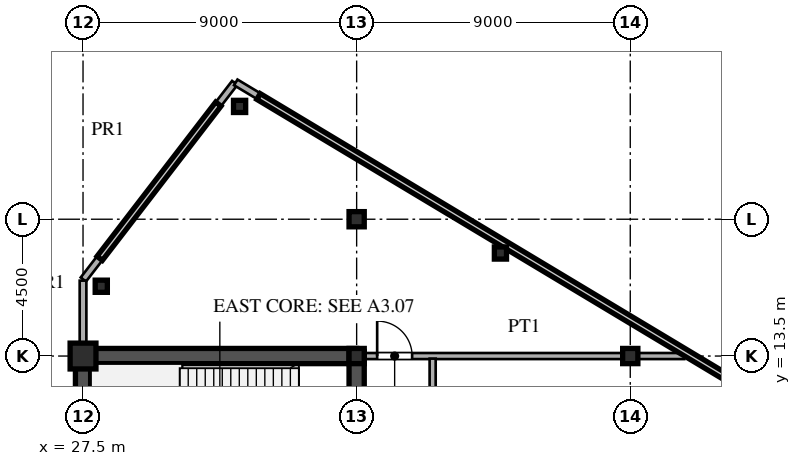
"""IFC4 building model, lengths in metres.
Left out: names, types, materials, properties, quantities, classifications, styles, units other than length and angle.
Written with IfcOpenShell. Run it as: python <this file> out.ifc"""

import sys

from ifc_helpers import new_model, si_unit, direction, frame, frame_2d, origin, origin_2d, place, context, subcontext, project, spatial, rectangle, hollow_rectangle, i_section, extrude, source, transform, mapped, element, fill, save


model = new_model("IFC4")
c1 = context("Model", 3, precision=1e-05, world=origin(), true_north=direction((0.0, 1.0)))
c2 = subcontext(c1, "Body", "Model", "MODEL_VIEW")
j1 = project(units=[si_unit("LENGTHUNIT", "METRE"), si_unit("PLANEANGLEUNIT", "RADIAN")], contexts=[c1])
p1 = place(None, origin())
s1 = spatial("IfcSite", under=j1, at=p1, CompositionType="ELEMENT")
p2 = place(p1, origin())
s2 = spatial("IfcBuilding", under=s1, at=p2, CompositionType="ELEMENT")
p3 = place(p2, frame((0.0, 0.0, 224.7)))
s3 = spatial("IfcBuildingStorey", under=s2, at=p3, CompositionType="ELEMENT", Elevation=224.7)
m1 = source(origin(), c2, "Body", "SweptSolid", [
    extrude(hollow_rectangle(XDim=0.85, YDim=0.85, WallThickness=0.036, at=origin_2d()), origin(), (0.0, 0.0, 1.0), 5.1),
])
p4 = place(p3, frame((27.5, 13.5, 0.0), z_axis=(0.0, 0.0, 1.0), x_axis=(1.0, 0.0, 0.0)))
e1 = element("IfcColumn", 1, at=p4, inside=s3, PredefinedType="COLUMN", context=c2, shape_type="MappedRepresentation", body=[
    mapped(m1, transform((0.0, 0.0, 0.0), scale=1.0)),
])
m2 = source(origin(), c2, "Body", "SweptSolid", [
    extrude(i_section(OverallWidth=0.5, OverallDepth=0.5, WebThickness=0.02, FlangeThickness=0.032, at=origin_2d()), origin(), (0.0, 0.0, 1.0), 5.1),
])
for number, where, z_axis, x_axis in (
    (2, (36.5, 13.5, 0.0), (0.0, 0.0, 1.0), (1.0, 0.0, 0.0)),
    (3, (36.5, 18.0, 0.0), (0.0, 0.0, 1.0), (1.0, 0.0, 0.0)),
    (4, (45.5, 13.5, 0.0), (0.0, 0.0, 1.0), (1.0, 0.0, 0.0)),
):
    element("IfcColumn", number, at=place(p3, frame(where, z_axis=z_axis, x_axis=x_axis)), inside=s3, PredefinedType="COLUMN", context=c2, shape_type="MappedRepresentation", body=[
        mapped(m2, transform((0.0, 0.0, 0.0), scale=1.0)),
    ])
m3 = source(origin(), c2, "Body", "SweptSolid", [
    extrude(hollow_rectangle(XDim=0.4, YDim=0.4, WallThickness=0.016, at=origin_2d()), origin(), (0.0, 0.0, 1.0), 5.1),
])
for number, where, z_axis, x_axis in (
    (5, (32.65, 21.71, 0.0), (0.0, 0.0, 1.0), (1.0, 0.0, 0.0)),
    (6, (28.1, 15.796, 0.0), (0.0, 0.0, 1.0), (1.0, 0.0, 0.0)),
    (7, (41.23, 16.889, 0.0), (0.0, 0.0, 1.0), (1.0, 0.0, 0.0)),
):
    element("IfcColumn", number, at=place(p3, frame(where, z_axis=z_axis, x_axis=x_axis)), inside=s3, PredefinedType="COLUMN", context=c2, shape_type="MappedRepresentation", body=[
        mapped(m3, transform((0.0, 0.0, 0.0), scale=1.0)),
    ])
p5 = place(p3, frame((67.483, 1.51, 0.0), z_axis=(0.0, 0.0, 1.0), x_axis=(-0.857492925713, 0.514495755428, 0.0)))
e8 = element("IfcWall", 8, at=p5, inside=s3, PredefinedType="PARAPET", context=c2, shape_type="SweptSolid", body=[
    extrude(rectangle(XDim=40.777, YDim=0.22, at=frame_2d((20.388, 0.0))), origin(), (0.0, 0.0, 1.0), 1.25),
])
p6 = place(p3, frame((32.488, 22.484, 0.0), z_axis=(0.0, 0.0, 1.0), x_axis=(-0.60971076085, -0.792623989105, 0.0)))
e9 = element("IfcWall", 9, at=p6, inside=s3, PredefinedType="PARAPET", context=c2, shape_type="SweptSolid", body=[
    extrude(rectangle(XDim=8.161, YDim=0.22, at=frame_2d((4.08, 0.0))), origin(), (0.0, 0.0, 1.0), 1.25),
])
p7 = place(p3, frame((27.5, 13.52, 0.0), z_axis=(0.0, 0.0, 1.0), x_axis=(0.0, 1.0, 0.0)))
e10 = element("IfcWall", 10, at=p7, inside=s3, PredefinedType="PARAPET", context=c2, shape_type="SweptSolid", body=[
    extrude(rectangle(XDim=2.46, YDim=0.22, at=frame_2d((1.23, 0.0))), origin(), (0.0, 0.0, 1.0), 1.25),
])
p8 = place(p3, frame((27.5, 1.3, 0.0), z_axis=(0.0, 0.0, 1.0), x_axis=(0.0, 1.0, 0.0)))
e11 = element("IfcWall", 11, at=p8, inside=s3, PredefinedType="SHEAR", context=c2, shape_type="SweptSolid", body=[
    extrude(rectangle(XDim=12.2, YDim=0.5, at=frame_2d((6.1, 0.0))), origin(), (0.0, 0.0, 1.0), 4.84),
])
p9 = place(p3, frame((27.5, 13.5, 0.0), z_axis=(0.0, 0.0, 1.0), x_axis=(1.0, 0.0, 0.0)))
e12 = element("IfcWall", 12, at=p9, inside=s3, PredefinedType="SHEAR", context=c2, shape_type="SweptSolid", body=[
    extrude(rectangle(XDim=9.0, YDim=0.5, at=frame_2d((4.5, 0.0))), origin(), (0.0, 0.0, 1.0), 4.84),
])
p10 = place(p3, frame((36.5, 8.2, 0.0), z_axis=(0.0, 0.0, 1.0), x_axis=(0.0, 1.0, 0.0)))
e13 = element("IfcWall", 13, at=p10, inside=s3, PredefinedType="SHEAR", context=c2, shape_type="SweptSolid", body=[
    extrude(rectangle(XDim=5.45, YDim=0.5, at=frame_2d((2.725, 0.0))), origin(), (0.0, 0.0, 1.0), 4.84),
])
p11 = place(p10, frame((0.245, 0.0, 0.0)))
e14 = element("IfcOpeningElement", 14, at=p11, cuts=e13, PredefinedType="OPENING", context=c2, shape_type="SweptSolid", body=[
    extrude(rectangle(XDim=0.95, YDim=2.15, at=frame_2d((0.475, 1.075))), frame((0.0, 0.26, 0.0), z_axis=(0.0, -1.0, 0.0), x_axis=(1.0, 0.0, 0.0)), (0.0, 0.0, 1.0), 0.52),
])
p12 = place(p3, frame((36.755, 13.5, 0.0), z_axis=(0.0, 0.0, 1.0), x_axis=(1.0, 0.0, 0.0)))
e15 = element("IfcWall", 15, at=p12, inside=s3, PredefinedType="PARTITIONING", context=c2, shape_type="SweptSolid", body=[
    extrude(rectangle(XDim=8.765, YDim=0.2, at=frame_2d((4.383, 0.0))), origin(), (0.0, 0.0, 1.0), 4.24),
])
p13 = place(p12, frame((0.42, 0.0, 0.0)))
e16 = element("IfcOpeningElement", 16, at=p13, cuts=e15, PredefinedType="OPENING", context=c2, shape_type="SweptSolid", body=[
    extrude(rectangle(XDim=1.15, YDim=2.2, at=frame_2d((0.575, 1.1))), frame((0.0, 0.11, 0.0), z_axis=(0.0, -1.0, 0.0), x_axis=(1.0, 0.0, 0.0)), (0.0, 0.0, 1.0), 0.22),
])
p14 = place(p3, frame((45.52, 13.5, 0.0), z_axis=(0.0, 0.0, 1.0), x_axis=(1.0, 0.0, 0.0)))
e17 = element("IfcWall", 17, at=p14, inside=s3, PredefinedType="PARTITIONING", context=c2, shape_type="SweptSolid", body=[
    extrude(rectangle(XDim=1.757, YDim=0.2, at=frame_2d((0.878, 0.0))), origin(), (0.0, 0.0, 1.0), 4.84),
])
p15 = place(p3, frame((39.0, -13.415, 0.0), z_axis=(0.0, 0.0, 1.0), x_axis=(0.0, 1.0, 0.0)))
e18 = element("IfcWall", 18, at=p15, inside=s3, PredefinedType="PARTITIONING", context=c2, shape_type="SweptSolid", body=[
    extrude(rectangle(XDim=26.83, YDim=0.2, at=frame_2d((13.415, 0.0))), origin(), (0.0, 0.0, 1.0), 4.84),
])
p16 = place(p15, frame((4.79, 0.0, 0.0)))
e19 = element("IfcOpeningElement", 19, at=p16, cuts=e18, PredefinedType="OPENING", context=c2, shape_type="SweptSolid", body=[
    extrude(rectangle(XDim=1.15, YDim=2.2, at=frame_2d((0.575, 1.1))), frame((0.0, 0.11, 0.0), z_axis=(0.0, -1.0, 0.0), x_axis=(1.0, 0.0, 0.0)), (0.0, 0.0, 1.0), 0.22),
])
p17 = place(p15, frame((12.84, 0.0, 0.0)))
e20 = element("IfcOpeningElement", 20, at=p17, cuts=e18, PredefinedType="OPENING", context=c2, shape_type="SweptSolid", body=[
    extrude(rectangle(XDim=1.15, YDim=2.2, at=frame_2d((0.575, 1.1))), frame((0.0, 0.11, 0.0), z_axis=(0.0, -1.0, 0.0), x_axis=(1.0, 0.0, 0.0)), (0.0, 0.0, 1.0), 0.22),
])
p18 = place(p15, frame((18.59, 0.0, 0.0)))
e21 = element("IfcOpeningElement", 21, at=p18, cuts=e18, PredefinedType="OPENING", context=c2, shape_type="SweptSolid", body=[
    extrude(rectangle(XDim=1.15, YDim=2.2, at=frame_2d((0.575, 1.1))), frame((0.0, 0.11, 0.0), z_axis=(0.0, -1.0, 0.0), x_axis=(1.0, 0.0, 0.0)), (0.0, 0.0, 1.0), 0.22),
])
p19 = place(p15, frame((23.64, 0.0, 0.0)))
e22 = element("IfcOpeningElement", 22, at=p19, cuts=e18, PredefinedType="OPENING", context=c2, shape_type="SweptSolid", body=[
    extrude(rectangle(XDim=1.15, YDim=2.2, at=frame_2d((0.575, 1.1))), frame((0.0, 0.11, 0.0), z_axis=(0.0, -1.0, 0.0), x_axis=(1.0, 0.0, 0.0)), (0.0, 0.0, 1.0), 0.22),
])
m4 = source(origin(), c2, "Body", "SweptSolid", [
    extrude(rectangle(XDim=1.15, YDim=2.2, at=frame_2d((0.575, 1.1))), frame((0.0, 0.025, 0.0), z_axis=(0.0, -1.0, 0.0), x_axis=(1.0, 0.0, 0.0)), (0.0, 0.0, 1.0), 0.05),
])
p20 = place(p13, origin())
e23 = element("IfcDoor", 23, at=p20, inside=s3, OperationType="SINGLE_SWING_LEFT", PredefinedType="DOOR", context=c2, shape_type="MappedRepresentation", body=[
    mapped(m4, transform((0.0, 0.0, 0.0), scale=1.0)),
])
fill(e16, e23)
save(model, sys.argv[1])
